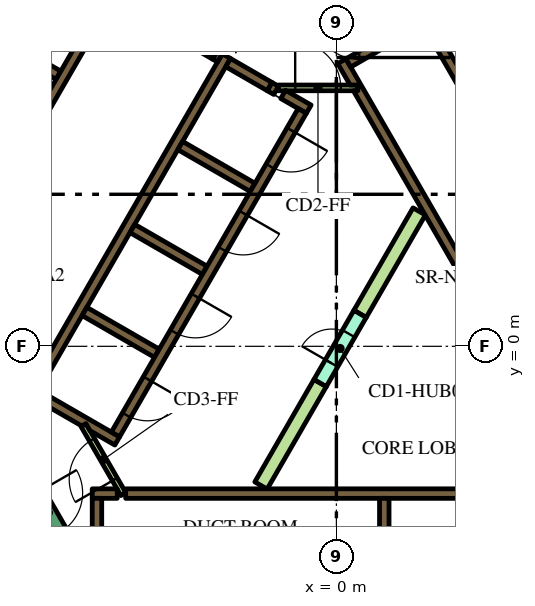
"""IFC4 building model, lengths in metres.
Left out: names, types, materials, properties, quantities, classifications, styles, units other than length and angle.
Written with IfcOpenShell. Run it as: python <this file> out.ifc"""

import sys

from ifc_helpers import new_model, si_unit, direction, frame, frame_2d, origin, place, context, subcontext, project, spatial, polyline, rectangle, outline, extrude, element, fill, save


model = new_model("IFC4")
c1 = context("Model", 3, precision=1e-05, world=origin(), true_north=direction((0.0, 1.0)))
c2 = subcontext(c1, "Body", "Model", "MODEL_VIEW")
j1 = project(units=[si_unit("LENGTHUNIT", "METRE"), si_unit("PLANEANGLEUNIT", "RADIAN")], contexts=[c1])
p1 = place(None, origin())
s1 = spatial("IfcSite", under=j1, at=p1, CompositionType="ELEMENT")
p2 = place(p1, origin())
s2 = spatial("IfcBuilding", under=s1, at=p2, CompositionType="ELEMENT")
p3 = place(p2, frame((0.0, 0.0, 35.4)))
s3 = spatial("IfcBuildingStorey", under=s2, at=p3, CompositionType="ELEMENT", Elevation=35.4)
p4 = place(p3, frame((-15.36, -1.503, 0.0), z_axis=(0.0, 0.0, 1.0), x_axis=(0.50000389221, 0.866023156604, 0.0)))
e1 = element("IfcWall", 1, at=p4, inside=s3, PredefinedType="SOLIDWALL", context=c2, shape_type="SweptSolid", body=[
    extrude(rectangle(XDim=21.0, YDim=0.9, at=frame_2d((10.5, 0.0))), origin(), (0.0, 0.0, 1.0), 3.9),
])
p5 = place(p3, frame((-5.545, -3.875, 0.0), z_axis=(0.0, 0.0, 1.0), x_axis=(1.0, 0.0, 0.0)))
e2 = element("IfcWall", 2, at=p5, inside=s3, PredefinedType="SOLIDWALL", context=c2, shape_type="SweptSolid", body=[
    extrude(rectangle(XDim=11.97, YDim=0.25, at=frame_2d((5.985, 0.0))), origin(), (0.0, 0.0, 1.0), 3.9),
])
p6 = place(p3, frame((-6.425, -3.875, 0.0), z_axis=(0.0, 0.0, 1.0), x_axis=(1.0, 0.0, 0.0)))
e3 = element("IfcWall", 3, at=p6, inside=s3, PredefinedType="SOLIDWALL", context=c2, shape_type="SweptSolid", body=[
    extrude(rectangle(XDim=0.658, YDim=0.25, at=frame_2d((0.329, 0.0))), origin(), (0.0, 0.0, 1.0), 3.9),
])
p7 = place(p3, frame((1.26, -4.0, 0.0), z_axis=(0.0, 0.0, 1.0), x_axis=(0.0, -1.0, 0.0)))
e4 = element("IfcWall", 4, at=p7, inside=s3, PredefinedType="SOLIDWALL", context=c2, shape_type="SweptSolid", body=[
    extrude(rectangle(XDim=2.2, YDim=0.25, at=frame_2d((1.1, 0.0))), origin(), (0.0, 0.0, 1.0), 3.9),
])
p8 = place(p3, frame((-6.3, -4.0, 0.0), z_axis=(0.0, 0.0, 1.0), x_axis=(0.0, -1.0, 0.0)))
e5 = element("IfcWall", 5, at=p8, inside=s3, PredefinedType="SOLIDWALL", context=c2, shape_type="SweptSolid", body=[
    extrude(rectangle(XDim=3.154, YDim=0.25, at=frame_2d((1.577, 0.0))), origin(), (0.0, 0.0, 1.0), 3.9),
])
p9 = place(p3, origin())
e6 = element("IfcWall", 6, at=p9, inside=s3, PredefinedType="SOLIDWALL", context=c2, shape_type="SweptSolid", body=[
    extrude(outline(polyline([(0.566, 6.725), (0.566, 6.875), (0.566, 6.875), (0.565, 6.875), (0.361, 6.875), (0.035, 7.439), (0.252, 7.564), (0.377, 7.348), (6.552, -3.348), (6.677, -3.564), (6.46, -3.689), (0.448, 6.725), (0.565, 6.725), (0.566, 6.725), (0.566, 6.725)])), origin(), (0.0, 0.0, 1.0), 3.9),
])
p10 = place(p3, frame((0.314, 7.456, 0.0), z_axis=(0.0, 0.0, 1.0), x_axis=(0.866013897511, 0.50001992892, 0.0)))
e7 = element("IfcWall", 7, at=p10, inside=s3, PredefinedType="SOLIDWALL", context=c2, shape_type="SweptSolid", body=[
    extrude(rectangle(XDim=3.268, YDim=0.25, at=frame_2d((1.634, 0.0))), origin(), (0.0, 0.0, 1.0), 3.9),
])
p11 = place(p3, frame((-8.06, -1.311, 0.0), z_axis=(0.0, 0.0, 1.0), x_axis=(0.50000273126, 0.866023826885, 0.0)))
e8 = element("IfcWall", 8, at=p11, inside=s3, PredefinedType="SOLIDWALL", context=c2, shape_type="SweptSolid", body=[
    extrude(rectangle(XDim=10.33, YDim=0.25, at=frame_2d((5.165, 0.0))), origin(), (0.0, 0.0, 1.0), 3.9),
])
p12 = place(p3, frame((-1.758, 6.835, 0.0), z_axis=(0.0, 0.0, 1.0), x_axis=(0.865982457891, -0.500074377092, 0.0)))
e9 = element("IfcWall", 9, at=p12, inside=s3, PredefinedType="SOLIDWALL", context=c2, shape_type="SweptSolid", body=[
    extrude(rectangle(XDim=0.2, YDim=0.25, at=frame_2d((0.1, 0.0))), origin(), (0.0, 0.0, 1.0), 3.9),
])
p13 = place(p3, frame((-1.76, 6.836, 0.0), z_axis=(0.0, 0.0, 1.0), x_axis=(-0.865952863304, 0.500125622755, 0.0)))
e10 = element("IfcWall", 10, at=p13, inside=s3, PredefinedType="SOLIDWALL", context=c2, shape_type="SweptSolid", body=[
    extrude(rectangle(XDim=1.258, YDim=0.25, at=frame_2d((0.629, 0.0))), origin(), (0.0, 0.0, 1.0), 3.9),
])
p14 = place(p3, frame((-0.728, 6.24, 0.0), z_axis=(0.0, 0.0, 1.0), x_axis=(-0.865955664968, 0.500120771724, 0.0)))
e11 = element("IfcWall", 11, at=p14, inside=s3, PredefinedType="SOLIDWALL", context=c2, shape_type="SweptSolid", body=[
    extrude(rectangle(XDim=0.778, YDim=0.25, at=frame_2d((0.389, 0.0))), origin(), (0.0, 0.0, 1.0), 3.9),
])
for number, where, z_axis, x_axis in (
    (12, (-2.204, 4.182, 0.0), (0.0, 0.0, 1.0), (-0.866, 0.5, 0.0)),
    (13, (-5.369, 3.1, 0.0), (0.0, 0.0, 1.0), (0.866, -0.5, 0.0)),
    (14, (-4.724, -0.182, 0.0), (0.0, 0.0, 1.0), (-0.866, 0.5, 0.0)),
):
    element("IfcWall", number, at=place(p3, frame(where, z_axis=z_axis, x_axis=x_axis)), inside=s3, PredefinedType="SOLIDWALL", context=c2, shape_type="SweptSolid", body=[
        extrude(rectangle(XDim=2.2, YDim=0.25, at=frame_2d((1.1, 0.0))), origin(), (0.0, 0.0, 1.0), 3.9),
    ])
e15 = element("IfcWall", 15, at=p9, inside=s3, PredefinedType="SOLIDWALL", context=c2, shape_type="SweptSolid", body=[
    extrude(outline(polyline([(-5.922, -2.257), (-5.922, -2.257), (-5.705, -2.382), (-5.83, -2.598), (-6.483, -2.221), (-6.591, -2.033), (-6.591, -2.033), (-6.7, -2.096), (-7.952, -1.373), (-7.827, -1.156), (-5.922, -2.257)])), origin(), (0.0, 0.0, 1.0), 3.9),
])
e16 = element("IfcWall", 16, at=p9, inside=s3, PredefinedType="SOLIDWALL", context=c2, shape_type="SweptSolid", body=[
    extrude(outline(polyline([(-3.128, 7.481), (-3.259, 7.557), (-3.134, 7.773), (-3.003, 7.698), (-3.128, 7.481)])), origin(), (0.0, 0.0, 1.0), 3.9),
])
p15 = place(p3, frame((-7.314, 7.132, 0.0), z_axis=(0.0, 0.0, 1.0), x_axis=(-0.866008176907, 0.50002983664, 0.0)))
e17 = element("IfcWall", 17, at=p15, inside=s3, PredefinedType="SOLIDWALL", context=c2, shape_type="SweptSolid", body=[
    extrude(rectangle(XDim=2.2, YDim=0.25, at=frame_2d((1.1, 0.0))), origin(), (0.0, 0.0, 1.0), 3.9),
])
e18 = element("IfcWall", 18, at=p9, inside=s3, PredefinedType="PARTITIONING", context=c2, shape_type="SweptSolid", body=[
    extrude(outline(polyline([(-0.59, -0.872), (-0.265, -1.059), (-1.822, -3.756), (-2.147, -3.568), (-0.59, -0.872)])), origin(), (0.0, 0.0, 1.0), 2.75),
])
e19 = element("IfcWall", 19, at=p9, inside=s3, PredefinedType="PARTITIONING", context=c2, shape_type="SweptSolid", body=[
    extrude(outline(polyline([(2.017, 3.643), (2.342, 3.456), (0.785, 0.76), (0.46, 0.947), (2.017, 3.643)])), origin(), (0.0, 0.0, 1.0), 2.75),
])
p16 = place(p3, frame((8.565, -2.185, 0.0), z_axis=(0.0, 0.0, 1.0), x_axis=(-0.499997954832, 0.866026584559, 0.0)))
e20 = element("IfcWall", 20, at=p16, inside=s3, PredefinedType="SOLIDWALL", context=c2, shape_type="SweptSolid", body=[
    extrude(rectangle(XDim=12.35, YDim=0.25, at=frame_2d((6.175, 0.0))), origin(), (0.0, 0.0, 1.0), 3.9),
])
p17 = place(p16, frame((5.725, 0.0, 0.0)))
e21 = element("IfcOpeningElement", 21, at=p17, cuts=e20, PredefinedType="OPENING", context=c2, shape_type="SweptSolid", body=[
    extrude(rectangle(XDim=0.9, YDim=2.1, at=frame_2d((0.45, 1.05))), frame((0.0, 0.135, 0.0), z_axis=(0.0, -1.0, 0.0), x_axis=(1.0, 0.0, 0.0)), (0.0, 0.0, 1.0), 0.27),
])
p18 = place(p3, frame((-6.008, 9.144, 0.0), z_axis=(0.0, 0.0, 1.0), x_axis=(-0.500006956611, -0.866021387346, 0.0)))
e22 = element("IfcWall", 22, at=p18, inside=s3, PredefinedType="SOLIDWALL", context=c2, shape_type="SweptSolid", body=[
    extrude(rectangle(XDim=9.83, YDim=0.25, at=frame_2d((4.915, 0.0))), origin(), (0.0, 0.0, 1.0), 3.9),
])
p19 = place(p18, frame((6.985, 0.0, 0.0)))
e23 = element("IfcOpeningElement", 23, at=p19, cuts=e22, PredefinedType="OPENING", context=c2, shape_type="SweptSolid", body=[
    extrude(rectangle(XDim=0.9, YDim=2.1, at=frame_2d((0.45, 1.05))), frame((0.0, 0.135, 0.0), z_axis=(0.0, -1.0, 0.0), x_axis=(1.0, 0.0, 0.0)), (0.0, 0.0, 1.0), 0.27),
])
p20 = place(p3, frame((-0.898, 6.194, 0.0), z_axis=(0.0, 0.0, 1.0), x_axis=(-0.499996202215, -0.866027596426, 0.0)))
e24 = element("IfcWall", 24, at=p20, inside=s3, PredefinedType="SOLIDWALL", context=c2, shape_type="SweptSolid", body=[
    extrude(rectangle(XDim=9.83, YDim=0.25, at=frame_2d((4.915, 0.0))), origin(), (0.0, 0.0, 1.0), 3.9),
])
p21 = place(p20, frame((0.585, 0.0, 0.0)))
e25 = element("IfcOpeningElement", 25, at=p21, cuts=e24, PredefinedType="OPENING", context=c2, shape_type="SweptSolid", body=[
    extrude(rectangle(XDim=1.1, YDim=2.1, at=frame_2d((0.55, 1.05))), frame((0.0, 0.135, 0.0), z_axis=(0.0, -1.0, 0.0), x_axis=(1.0, 0.0, 0.0)), (0.0, 0.0, 1.0), 0.27),
])
p22 = place(p20, frame((3.105, 0.0, 0.0)))
e26 = element("IfcOpeningElement", 26, at=p22, cuts=e24, PredefinedType="OPENING", context=c2, shape_type="SweptSolid", body=[
    extrude(rectangle(XDim=1.1, YDim=2.1, at=frame_2d((0.55, 1.05))), frame((0.0, 0.135, 0.0), z_axis=(0.0, -1.0, 0.0), x_axis=(1.0, 0.0, 0.0)), (0.0, 0.0, 1.0), 0.27),
])
p23 = place(p20, frame((5.625, 0.0, 0.0)))
e27 = element("IfcOpeningElement", 27, at=p23, cuts=e24, PredefinedType="OPENING", context=c2, shape_type="SweptSolid", body=[
    extrude(rectangle(XDim=1.1, YDim=2.1, at=frame_2d((0.55, 1.05))), frame((0.0, 0.135, 0.0), z_axis=(0.0, -1.0, 0.0), x_axis=(1.0, 0.0, 0.0)), (0.0, 0.0, 1.0), 0.27),
])
p24 = place(p20, frame((8.145, 0.0, 0.0)))
e28 = element("IfcOpeningElement", 28, at=p24, cuts=e24, PredefinedType="OPENING", context=c2, shape_type="SweptSolid", body=[
    extrude(rectangle(XDim=1.1, YDim=2.1, at=frame_2d((0.55, 1.05))), frame((0.0, 0.135, 0.0), z_axis=(0.0, -1.0, 0.0), x_axis=(1.0, 0.0, 0.0)), (0.0, 0.0, 1.0), 0.27),
])
p25 = place(p3, frame((-8.103, -3.466, 0.0), z_axis=(0.0, 0.0, 1.0), x_axis=(0.500078061341, -0.865980330357, 0.0)))
e29 = element("IfcWall", 29, at=p25, inside=s3, PredefinedType="SOLIDWALL", context=c2, shape_type="SweptSolid", body=[
    extrude(rectangle(XDim=2.1, YDim=0.4, at=frame_2d((1.05, 0.0))), origin(), (0.0, 0.0, 1.0), 3.9),
])
p26 = place(p25, frame((0.45, 0.0, 0.0)))
e30 = element("IfcOpeningElement", 30, at=p26, cuts=e29, PredefinedType="OPENING", context=c2, shape_type="SweptSolid", body=[
    extrude(rectangle(XDim=1.2, YDim=2.1, at=frame_2d((0.6, 1.05))), frame((0.0, 0.21, 0.0), z_axis=(0.0, -1.0, 0.0), x_axis=(1.0, 0.0, 0.0)), (0.0, 0.0, 1.0), 0.42),
])
p27 = place(p3, frame((-0.427, -0.966, 0.0), z_axis=(0.0, 0.0, 1.0), x_axis=(0.49994051562, 0.866059744384, 0.0)))
e31 = element("IfcWall", 31, at=p27, inside=s3, PredefinedType="PARTITIONING", context=c2, shape_type="SweptSolid", body=[
    extrude(rectangle(XDim=2.1, YDim=0.375, at=frame_2d((1.05, 0.0))), origin(), (0.0, 0.0, 1.0), 2.75),
])
p28 = place(p27, frame((0.6, 0.0, 0.0)))
e32 = element("IfcOpeningElement", 32, at=p28, cuts=e31, PredefinedType="OPENING", context=c2, shape_type="SweptSolid", body=[
    extrude(rectangle(XDim=0.9, YDim=2.1, at=frame_2d((0.45, 1.05))), frame((0.0, 0.198, 0.0), z_axis=(0.0, -1.0, 0.0), x_axis=(1.0, 0.0, 0.0)), (0.0, 0.0, 1.0), 0.395),
])
p29 = place(p3, frame((-1.534, 6.8, 0.0), z_axis=(0.0, 0.0, 1.0), x_axis=(1.0, 0.0, 0.0)))
e33 = element("IfcWall", 33, at=p29, inside=s3, PredefinedType="PARTITIONING", context=c2, shape_type="SweptSolid", body=[
    extrude(rectangle(XDim=2.1, YDim=0.15, at=frame_2d((1.05, 0.0))), origin(), (0.0, 0.0, 1.0), 2.75),
])
p30 = place(p29, frame((0.45, 0.0, 0.0)))
e34 = element("IfcOpeningElement", 34, at=p30, cuts=e33, PredefinedType="OPENING", context=c2, shape_type="SweptSolid", body=[
    extrude(rectangle(XDim=1.2, YDim=2.1, at=frame_2d((0.6, 1.05))), frame((0.0, 0.085, 0.0), z_axis=(0.0, -1.0, 0.0), x_axis=(1.0, 0.0, 0.0)), (0.0, 0.0, 1.0), 0.17),
])
p31 = place(p3, frame((-5.606, -3.89, 0.0), z_axis=(0.0, 0.0, 1.0), x_axis=(-0.500027713859, 0.866009402589, 0.0)))
e35 = element("IfcWall", 35, at=p31, inside=s3, PredefinedType="PARTITIONING", context=c2, shape_type="SweptSolid", body=[
    extrude(rectangle(XDim=2.1, YDim=0.15, at=frame_2d((1.05, 0.0))), origin(), (0.0, 0.0, 1.0), 2.75),
])
p32 = place(p31, frame((0.45, 0.0, 0.0)))
e36 = element("IfcOpeningElement", 36, at=p32, cuts=e35, PredefinedType="OPENING", context=c2, shape_type="SweptSolid", body=[
    extrude(rectangle(XDim=1.2, YDim=2.1, at=frame_2d((0.6, 1.05))), frame((0.0, 0.085, 0.0), z_axis=(0.0, -1.0, 0.0), x_axis=(1.0, 0.0, 0.0)), (0.0, 0.0, 1.0), 0.17),
])
p33 = place(p3, frame((-4.409, 8.365, 0.0), z_axis=(0.0, 0.0, 1.0), x_axis=(0.866034573852, -0.49998411664, 0.0)))
e37 = element("IfcWall", 37, at=p33, inside=s3, PredefinedType="SOLIDWALL", context=c2, shape_type="SweptSolid", body=[
    extrude(rectangle(XDim=1.4, YDim=0.25, at=frame_2d((0.7, 0.0))), origin(), (0.0, 0.0, 1.0), 3.9),
])
p34 = place(p33, frame((0.1, 0.0, 0.0)))
e38 = element("IfcOpeningElement", 38, at=p34, cuts=e37, PredefinedType="OPENING", context=c2, shape_type="SweptSolid", body=[
    extrude(rectangle(XDim=1.2, YDim=2.1, at=frame_2d((0.6, 1.05))), frame((0.0, 0.135, 0.0), z_axis=(0.0, -1.0, 0.0), x_axis=(1.0, 0.0, 0.0)), (0.0, 0.0, 1.0), 0.27),
])
p35 = place(p3, frame((-19.081, -3.9, 0.0), z_axis=(0.0, 0.0, 1.0), x_axis=(0.499998313975, 0.866026377209, 0.0)))
e39 = element("IfcWall", 39, at=p35, inside=s3, PredefinedType="PARTITIONING", context=c2, shape_type="SweptSolid", body=[
    extrude(rectangle(XDim=25.766, YDim=0.15, at=frame_2d((12.883, 0.0))), origin(), (0.0, 0.0, 1.0), 2.75),
])
p36 = place(p35, frame((24.586, 0.0, 0.0)))
e40 = element("IfcOpeningElement", 40, at=p36, cuts=e39, PredefinedType="OPENING", context=c2, shape_type="SweptSolid", body=[
    extrude(rectangle(XDim=1.0, YDim=2.1, at=frame_2d((0.5, 1.05))), frame((0.0, 0.085, 0.0), z_axis=(0.0, -1.0, 0.0), x_axis=(1.0, 0.0, 0.0)), (0.0, 0.0, 1.0), 0.17),
])
p37 = place(p35, frame((16.196, 0.0, 0.0)))
e41 = element("IfcOpeningElement", 41, at=p37, cuts=e39, PredefinedType="OPENING", context=c2, shape_type="SweptSolid", body=[
    extrude(rectangle(XDim=1.0, YDim=2.1, at=frame_2d((0.5, 1.05))), frame((0.0, 0.085, 0.0), z_axis=(0.0, -1.0, 0.0), x_axis=(1.0, 0.0, 0.0)), (0.0, 0.0, 1.0), 0.17),
])
p38 = place(p35, frame((14.789, 0.0, 0.0)))
e42 = element("IfcOpeningElement", 42, at=p38, cuts=e39, PredefinedType="OPENING", context=c2, shape_type="SweptSolid", body=[
    extrude(rectangle(XDim=1.1, YDim=2.1, at=frame_2d((0.55, 1.05))), frame((0.0, 0.085, 0.0), z_axis=(0.0, -1.0, 0.0), x_axis=(1.0, 0.0, 0.0)), (0.0, 0.0, 1.0), 0.17),
])
p39 = place(p35, frame((3.698, 0.0, 0.0)))
e43 = element("IfcOpeningElement", 43, at=p39, cuts=e39, PredefinedType="OPENING", context=c2, shape_type="SweptSolid", body=[
    extrude(rectangle(XDim=1.0, YDim=2.1, at=frame_2d((0.5, 1.05))), frame((0.0, 0.085, 0.0), z_axis=(0.0, -1.0, 0.0), x_axis=(1.0, 0.0, 0.0)), (0.0, 0.0, 1.0), 0.17),
])
p40 = place(p35, frame((1.531, 0.0, 0.0)))
e44 = element("IfcOpeningElement", 44, at=p40, cuts=e39, PredefinedType="OPENING", context=c2, shape_type="SweptSolid", body=[
    extrude(rectangle(XDim=0.9, YDim=2.1, at=frame_2d((0.45, 1.05))), frame((0.0, 0.085, 0.0), z_axis=(0.0, -1.0, 0.0), x_axis=(1.0, 0.0, 0.0)), (0.0, 0.0, 1.0), 0.17),
])
p41 = place(p21, origin())
e45 = element("IfcDoor", 45, at=p41, inside=s3, OperationType="DOUBLE_DOOR_SLIDING", PredefinedType="DOOR", context=c2, shape_type="SweptSolid", body=[
    extrude(rectangle(XDim=1.1, YDim=2.1, at=frame_2d((0.55, 1.05))), frame((0.0, 0.025, 0.0), z_axis=(0.0, -1.0, 0.0), x_axis=(1.0, 0.0, 0.0)), (0.0, 0.0, 1.0), 0.05),
])
fill(e25, e45)
p42 = place(p22, origin())
e46 = element("IfcDoor", 46, at=p42, inside=s3, OperationType="DOUBLE_DOOR_SLIDING", PredefinedType="DOOR", context=c2, shape_type="SweptSolid", body=[
    extrude(rectangle(XDim=1.1, YDim=2.1, at=frame_2d((0.55, 1.05))), frame((0.0, 0.025, 0.0), z_axis=(0.0, -1.0, 0.0), x_axis=(1.0, 0.0, 0.0)), (0.0, 0.0, 1.0), 0.05),
])
fill(e26, e46)
p43 = place(p23, origin())
e47 = element("IfcDoor", 47, at=p43, inside=s3, OperationType="DOUBLE_DOOR_SLIDING", PredefinedType="DOOR", context=c2, shape_type="SweptSolid", body=[
    extrude(rectangle(XDim=1.1, YDim=2.1, at=frame_2d((0.55, 1.05))), frame((0.0, 0.025, 0.0), z_axis=(0.0, -1.0, 0.0), x_axis=(1.0, 0.0, 0.0)), (0.0, 0.0, 1.0), 0.05),
])
fill(e27, e47)
p44 = place(p24, origin())
e48 = element("IfcDoor", 48, at=p44, inside=s3, OperationType="DOUBLE_DOOR_SLIDING", PredefinedType="DOOR", context=c2, shape_type="SweptSolid", body=[
    extrude(rectangle(XDim=1.1, YDim=2.1, at=frame_2d((0.55, 1.05))), frame((0.0, 0.025, 0.0), z_axis=(0.0, -1.0, 0.0), x_axis=(1.0, 0.0, 0.0)), (0.0, 0.0, 1.0), 0.05),
])
fill(e28, e48)
p45 = place(p26, origin())
e49 = element("IfcDoor", 49, at=p45, inside=s3, OperationType="SINGLE_SWING_LEFT", PredefinedType="DOOR", context=c2, shape_type="SweptSolid", body=[
    extrude(rectangle(XDim=1.2, YDim=2.1, at=frame_2d((0.6, 1.05))), frame((0.0, 0.025, 0.0), z_axis=(0.0, -1.0, 0.0), x_axis=(1.0, 0.0, 0.0)), (0.0, 0.0, 1.0), 0.05),
])
fill(e30, e49)
p46 = place(p28, origin())
e50 = element("IfcDoor", 50, at=p46, inside=s3, OperationType="SINGLE_SWING_LEFT", PredefinedType="DOOR", context=c2, shape_type="SweptSolid", body=[
    extrude(rectangle(XDim=0.9, YDim=2.1, at=frame_2d((0.45, 1.05))), frame((0.0, 0.025, 0.0), z_axis=(0.0, -1.0, 0.0), x_axis=(1.0, 0.0, 0.0)), (0.0, 0.0, 1.0), 0.05),
])
fill(e32, e50)
p47 = place(p30, origin())
e51 = element("IfcDoor", 51, at=p47, inside=s3, OperationType="SINGLE_SWING_LEFT", PredefinedType="DOOR", context=c2, shape_type="SweptSolid", body=[
    extrude(rectangle(XDim=1.2, YDim=2.1, at=frame_2d((0.6, 1.05))), frame((0.0, 0.025, 0.0), z_axis=(0.0, -1.0, 0.0), x_axis=(1.0, 0.0, 0.0)), (0.0, 0.0, 1.0), 0.05),
])
fill(e34, e51)
p48 = place(p32, origin())
e52 = element("IfcDoor", 52, at=p48, inside=s3, OperationType="SINGLE_SWING_LEFT", PredefinedType="DOOR", context=c2, shape_type="SweptSolid", body=[
    extrude(rectangle(XDim=1.2, YDim=2.1, at=frame_2d((0.6, 1.05))), frame((0.0, 0.025, 0.0), z_axis=(0.0, -1.0, 0.0), x_axis=(1.0, 0.0, 0.0)), (0.0, 0.0, 1.0), 0.05),
])
fill(e36, e52)
p49 = place(p34, origin())
e53 = element("IfcDoor", 53, at=p49, inside=s3, OperationType="SINGLE_SWING_LEFT", PredefinedType="DOOR", context=c2, shape_type="SweptSolid", body=[
    extrude(rectangle(XDim=1.2, YDim=2.1, at=frame_2d((0.6, 1.05))), frame((0.0, 0.025, 0.0), z_axis=(0.0, -1.0, 0.0), x_axis=(1.0, 0.0, 0.0)), (0.0, 0.0, 1.0), 0.05),
])
fill(e38, e53)
save(model, sys.argv[1])
